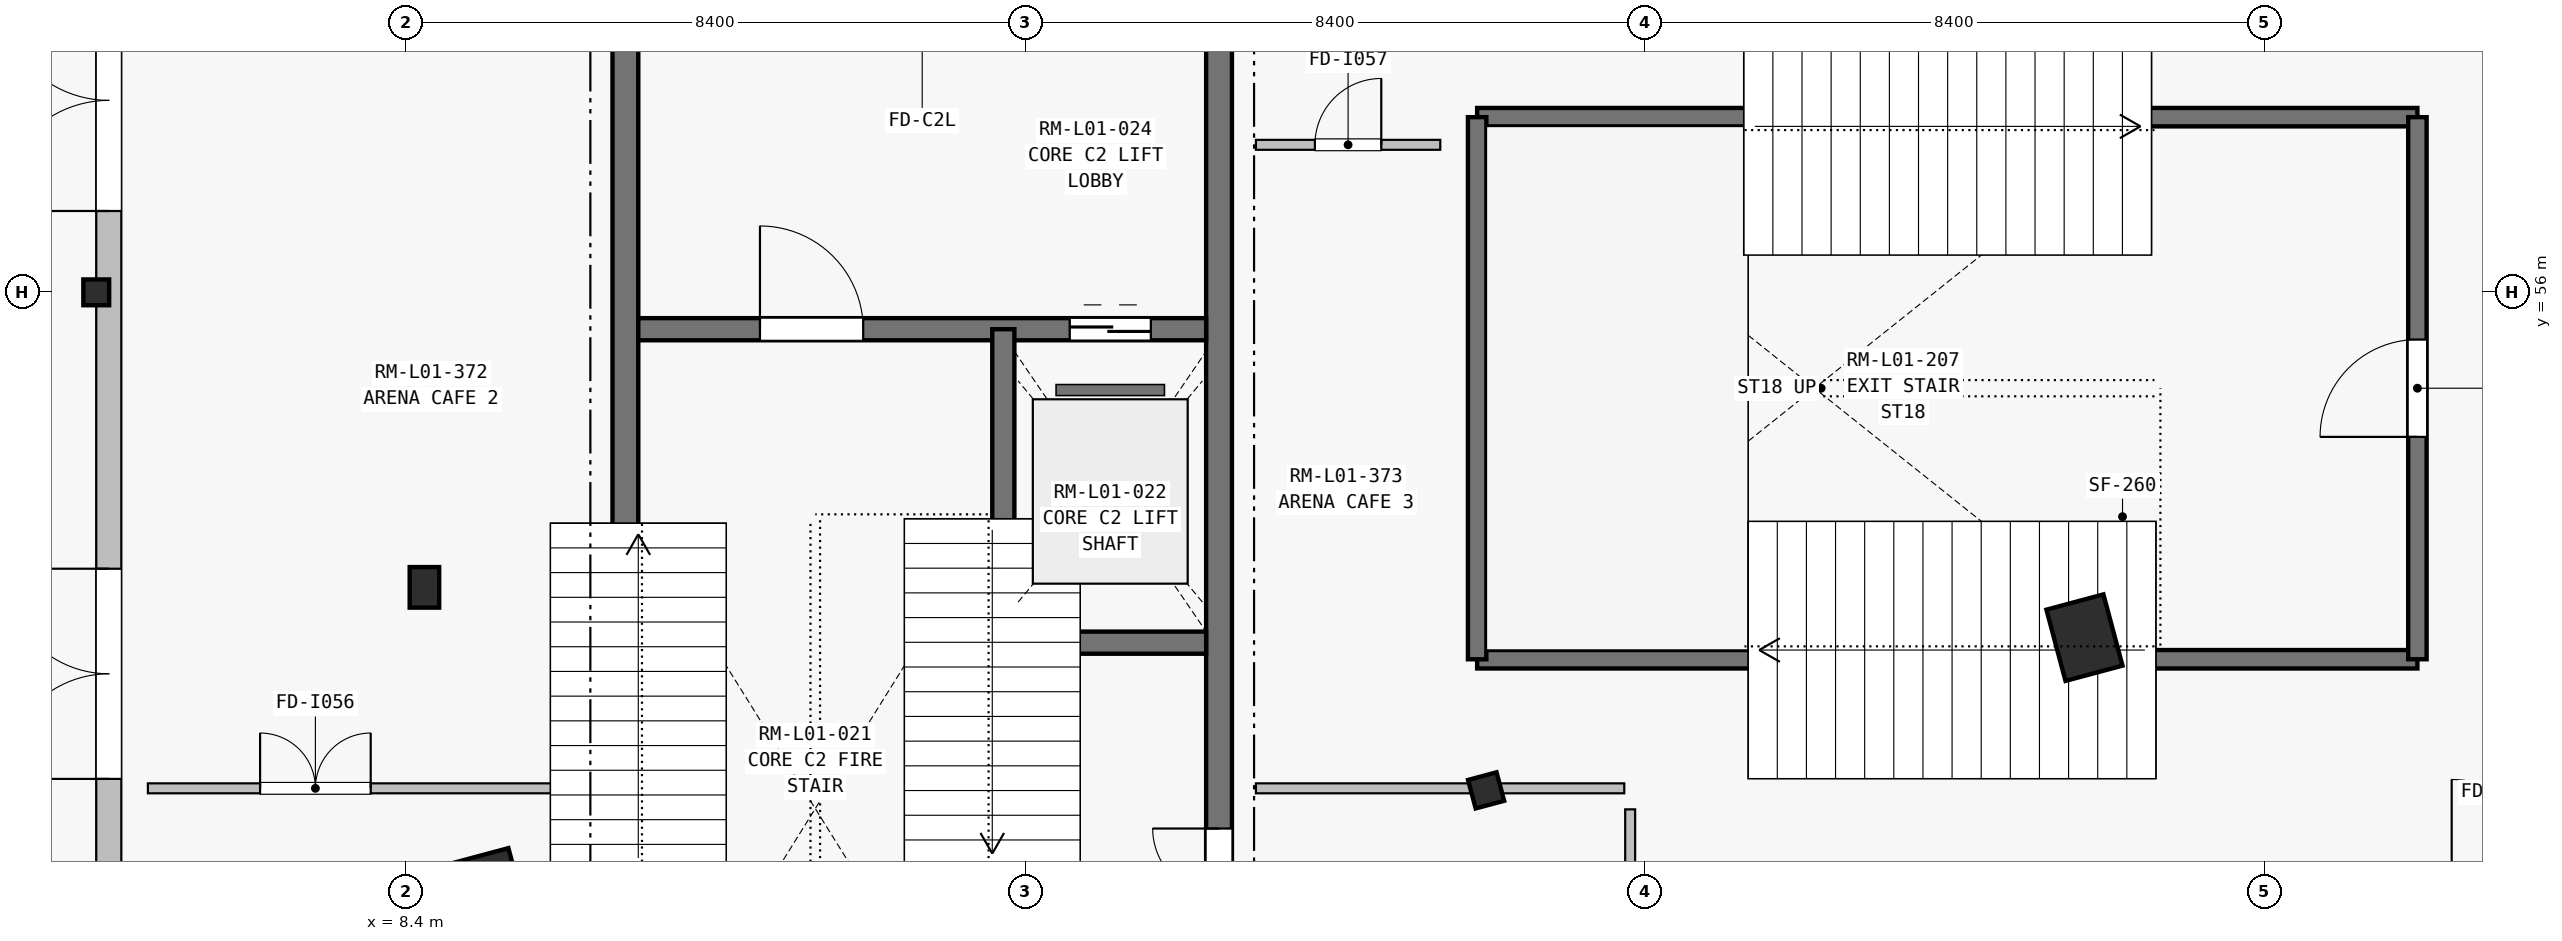
"""IFC4 building model, lengths in metres.
Left out: names, types, materials, properties, quantities, classifications, styles, units other than length and angle.
Written with IfcOpenShell. Run it as: python <this file> out.ifc"""

import sys

from ifc_helpers import new_model, si_unit, direction, frame, frame_2d, origin, origin_2d, place, context, subcontext, project, spatial, rectangle, i_section, extrude, element, fill, save


model = new_model("IFC4")
c1 = context("Model", 3, precision=1e-05, world=origin(), true_north=direction((0.0, 1.0)))
c2 = subcontext(c1, "Body", "Model", "MODEL_VIEW")
j1 = project(units=[si_unit("LENGTHUNIT", "METRE"), si_unit("PLANEANGLEUNIT", "RADIAN")], contexts=[c1])
p1 = place(None, origin())
s1 = spatial("IfcSite", under=j1, at=p1, CompositionType="ELEMENT")
p2 = place(p1, origin())
s2 = spatial("IfcBuilding", under=s1, at=p2, CompositionType="ELEMENT")
p3 = place(p2, frame((0.0, 0.0, 5.4)))
s3 = spatial("IfcBuildingStorey", under=s2, at=p3, CompositionType="ELEMENT", Elevation=5.4)
p4 = place(p3, frame((31.16, 51.318, 0.0), z_axis=(0.0, 0.0, 1.0), x_axis=(-0.965925826289, -0.258819045103, 0.0)))
e1 = element("IfcColumn", 1, at=p4, inside=s3, PredefinedType="COLUMN", context=c2, shape_type="SweptSolid", body=[
    extrude(rectangle(XDim=0.8, YDim=1.0, at=origin_2d()), origin(), (0.0, 0.0, 1.0), 4.5),
])
p5 = place(p3, frame((23.046, 49.247, 0.0), z_axis=(0.0, 0.0, 1.0), x_axis=(-0.965925826289, -0.258819045103, 0.0)))
e2 = element("IfcColumn", 2, at=p5, inside=s3, PredefinedType="COLUMN", context=c2, shape_type="SweptSolid", body=[
    extrude(i_section(OverallWidth=0.4, OverallDepth=0.4, WebThickness=0.018, FlangeThickness=0.032, at=origin_2d()), origin(), (0.0, 0.0, 1.0), 4.5),
])
p6 = place(p3, frame((9.524, 48.005, 0.0), z_axis=(0.0, 0.0, 1.0), x_axis=(-0.965925826289, -0.258819045103, 0.0)))
e3 = element("IfcColumn", 3, at=p6, inside=s3, PredefinedType="COLUMN", context=c2, shape_type="SweptSolid", body=[
    extrude(rectangle(XDim=0.75, YDim=0.75, at=origin_2d()), origin(), (0.0, 0.0, 1.0), 4.24),
])
p7 = place(p3, frame((4.2, 56.0, 0.0), z_axis=(0.0, 0.0, 1.0), x_axis=(1.0, 0.0, 0.0)))
e4 = element("IfcColumn", 4, at=p7, inside=s3, PredefinedType="COLUMN", context=c2, shape_type="SweptSolid", body=[
    extrude(i_section(OverallWidth=0.35, OverallDepth=0.35, WebThickness=0.014, FlangeThickness=0.024, at=origin_2d()), origin(), (0.0, 0.0, 1.0), 4.15),
])
p8 = place(p3, frame((8.65, 52.0, 0.0), z_axis=(0.0, 0.0, 1.0), x_axis=(1.0, 0.0, 0.0)))
e5 = element("IfcColumn", 5, at=p8, inside=s3, PredefinedType="PILASTER", context=c2, shape_type="SweptSolid", body=[
    extrude(rectangle(XDim=0.4, YDim=0.55, at=origin_2d()), origin(), (0.0, 0.0, 1.0), 4.5),
])
p9 = place(p3, frame((4.37, 35.803, 0.0), z_axis=(0.0, 0.0, 1.0), x_axis=(0.0, 1.0, 0.0)))
e6 = element("IfcWall", 6, at=p9, inside=s3, PredefinedType="SOLIDWALL", context=c2, shape_type="SweptSolid", body=[
    extrude(rectangle(XDim=56.395, YDim=0.34, at=frame_2d((28.197, 0.0))), origin(), (0.0, 0.0, 1.0), 3.673),
])
p10 = place(p9, frame((7.4, 0.0, 0.0)))
e7 = element("IfcOpeningElement", 7, at=p10, cuts=e6, PredefinedType="OPENING", context=c2, shape_type="SweptSolid", body=[
    extrude(rectangle(XDim=3.0, YDim=2.55, at=frame_2d((1.5, 1.275))), frame((0.0, 0.18, 0.0), z_axis=(0.0, -1.0, 0.0), x_axis=(1.0, 0.0, 0.0)), (0.0, 0.0, 1.0), 0.36),
])
p11 = place(p9, frame((13.6, 0.0, 0.0)))
e8 = element("IfcOpeningElement", 8, at=p11, cuts=e6, PredefinedType="OPENING", context=c2, shape_type="SweptSolid", body=[
    extrude(rectangle(XDim=2.85, YDim=2.5, at=frame_2d((1.425, 1.25))), frame((0.0, 0.18, 0.0), z_axis=(0.0, -1.0, 0.0), x_axis=(1.0, 0.0, 0.0)), (0.0, 0.0, 1.0), 0.36),
])
p12 = place(p9, frame((21.3, 0.0, 0.0)))
e9 = element("IfcOpeningElement", 9, at=p12, cuts=e6, PredefinedType="OPENING", context=c2, shape_type="SweptSolid", body=[
    extrude(rectangle(XDim=3.0, YDim=2.55, at=frame_2d((1.5, 1.275))), frame((0.0, 0.18, 0.0), z_axis=(0.0, -1.0, 0.0), x_axis=(1.0, 0.0, 0.0)), (0.0, 0.0, 1.0), 0.36),
])
p13 = place(p9, frame((32.2, 0.0, 0.0)))
e10 = element("IfcOpeningElement", 10, at=p13, cuts=e6, PredefinedType="OPENING", context=c2, shape_type="SweptSolid", body=[
    extrude(rectangle(XDim=2.85, YDim=2.5, at=frame_2d((1.425, 1.25))), frame((0.0, 0.18, 0.0), z_axis=(0.0, -1.0, 0.0), x_axis=(1.0, 0.0, 0.0)), (0.0, 0.0, 1.0), 0.36),
])
p14 = place(p9, frame((28.935, 0.0, 0.0)))
e11 = element("IfcOpeningElement", 11, at=p14, cuts=e6, PredefinedType="OPENING", context=c2, shape_type="SweptSolid", body=[
    extrude(rectangle(XDim=1.8, YDim=2.35, at=frame_2d((0.9, 1.175))), frame((0.0, 0.18, 0.0), z_axis=(0.0, -1.0, 0.0), x_axis=(1.0, 0.0, 0.0)), (0.0, 0.0, 1.0), 0.36),
])
p15 = place(p9, frame((25.825, 0.0, 0.9)))
e12 = element("IfcOpeningElement", 12, at=p15, cuts=e6, PredefinedType="OPENING", context=c2, shape_type="SweptSolid", body=[
    extrude(rectangle(XDim=0.85, YDim=2.1, at=frame_2d((0.425, 1.05))), frame((0.0, 0.18, 0.0), z_axis=(0.0, -1.0, 0.0), x_axis=(1.0, 0.0, 0.0)), (0.0, 0.0, 1.0), 0.36),
])
p16 = place(p9, frame((39.225, 0.0, 0.75)))
e13 = element("IfcOpeningElement", 13, at=p16, cuts=e6, PredefinedType="OPENING", context=c2, shape_type="SweptSolid", body=[
    extrude(rectangle(XDim=1.65, YDim=2.4, at=frame_2d((0.825, 1.2))), frame((0.0, 0.18, 0.0), z_axis=(0.0, -1.0, 0.0), x_axis=(1.0, 0.0, 0.0)), (0.0, 0.0, 1.0), 0.36),
])
p17 = place(p9, frame((48.65, 0.0, 0.75)))
e14 = element("IfcOpeningElement", 14, at=p17, cuts=e6, PredefinedType="OPENING", context=c2, shape_type="SweptSolid", body=[
    extrude(rectangle(XDim=1.2, YDim=2.2, at=frame_2d((0.6, 1.1))), frame((0.0, 0.18, 0.0), z_axis=(0.0, -1.0, 0.0), x_axis=(1.0, 0.0, 0.0)), (0.0, 0.0, 1.0), 0.36),
])
p18 = place(p3, frame((11.375, 44.975, 0.0), z_axis=(0.0, 0.0, 1.0), x_axis=(0.0, 1.0, 0.0)))
e15 = element("IfcWall", 15, at=p18, inside=s3, PredefinedType="SHEAR", context=c2, shape_type="SweptSolid", body=[
    extrude(rectangle(XDim=14.85, YDim=0.35, at=frame_2d((7.425, 0.0))), origin(), (0.0, 0.0, 1.0), 4.5),
])
p19 = place(p3, frame((19.425, 44.975, 0.0), z_axis=(0.0, 0.0, 1.0), x_axis=(0.0, 1.0, 0.0)))
e16 = element("IfcWall", 16, at=p19, inside=s3, PredefinedType="SHEAR", context=c2, shape_type="SweptSolid", body=[
    extrude(rectangle(XDim=14.85, YDim=0.35, at=frame_2d((7.425, 0.0))), origin(), (0.0, 0.0, 1.0), 4.5),
])
p20 = place(p19, frame((2.855, 0.0, 0.0)))
e17 = element("IfcOpeningElement", 17, at=p20, cuts=e16, PredefinedType="OPENING", context=c2, shape_type="SweptSolid", body=[
    extrude(rectangle(XDim=0.9, YDim=2.1, at=frame_2d((0.45, 1.05))), frame((0.0, 0.185, 0.0), z_axis=(0.0, -1.0, 0.0), x_axis=(1.0, 0.0, 0.0)), (0.0, 0.0, 1.0), 0.37),
])
p21 = place(p3, frame((11.55, 55.5, 0.0), z_axis=(0.0, 0.0, 1.0), x_axis=(1.0, 0.0, 0.0)))
e18 = element("IfcWall", 18, at=p21, inside=s3, PredefinedType="SHEAR", context=c2, shape_type="SweptSolid", body=[
    extrude(rectangle(XDim=7.7, YDim=0.3, at=frame_2d((3.85, 0.0))), origin(), (0.0, 0.0, 1.0), 4.5),
])
p22 = place(p21, frame((1.65, 0.0, 0.0)))
e19 = element("IfcOpeningElement", 19, at=p22, cuts=e18, PredefinedType="OPENING", context=c2, shape_type="SweptSolid", body=[
    extrude(rectangle(XDim=1.4, YDim=2.2, at=frame_2d((0.7, 1.1))), frame((0.0, 0.16, 0.0), z_axis=(0.0, -1.0, 0.0), x_axis=(1.0, 0.0, 0.0)), (0.0, 0.0, 1.0), 0.32),
])
p23 = place(p21, frame((5.85, 0.0, 0.0)))
e20 = element("IfcOpeningElement", 20, at=p23, cuts=e18, PredefinedType="OPENING", context=c2, shape_type="SweptSolid", body=[
    extrude(rectangle(XDim=1.1, YDim=2.2, at=frame_2d((0.55, 1.1))), frame((0.0, 0.16, 0.0), z_axis=(0.0, -1.0, 0.0), x_axis=(1.0, 0.0, 0.0)), (0.0, 0.0, 1.0), 0.32),
])
p24 = place(p3, frame((16.5, 45.15, 0.0), z_axis=(0.0, 0.0, 1.0), x_axis=(0.0, 1.0, 0.0)))
e21 = element("IfcWall", 21, at=p24, inside=s3, PredefinedType="SHEAR", context=c2, shape_type="SweptSolid", body=[
    extrude(rectangle(XDim=10.35, YDim=0.3, at=frame_2d((5.175, 0.0))), origin(), (0.0, 0.0, 1.0), 4.5),
])
p25 = place(p3, frame((16.65, 51.25, 0.0), z_axis=(0.0, 0.0, 1.0), x_axis=(1.0, 0.0, 0.0)))
e22 = element("IfcWall", 22, at=p25, inside=s3, PredefinedType="SHEAR", context=c2, shape_type="SweptSolid", body=[
    extrude(rectangle(XDim=2.6, YDim=0.3, at=frame_2d((1.3, 0.0))), origin(), (0.0, 0.0, 1.0), 4.5),
])
for number, where, z_axis, x_axis in (
    (23, (22.925, 51.025, 0.0), (0.0, 0.0, 1.0), (1.0, 0.0, 0.0)),
    (24, (22.925, 58.375, 0.0), (0.0, 0.0, 1.0), (1.0, 0.0, 0.0)),
):
    element("IfcWall", number, at=place(p3, frame(where, z_axis=z_axis, x_axis=x_axis)), inside=s3, PredefinedType="SHEAR", context=c2, shape_type="SweptSolid", body=[
        extrude(rectangle(XDim=12.75, YDim=0.25, at=frame_2d((6.375, 0.0))), origin(), (0.0, 0.0, 1.0), 4.5),
    ])
p26 = place(p3, frame((22.925, 51.025, 0.0), z_axis=(0.0, 0.0, 1.0), x_axis=(0.0, 1.0, 0.0)))
e25 = element("IfcWall", 25, at=p26, inside=s3, PredefinedType="SHEAR", context=c2, shape_type="SweptSolid", body=[
    extrude(rectangle(XDim=7.35, YDim=0.25, at=frame_2d((3.675, 0.0))), origin(), (0.0, 0.0, 1.0), 4.5),
])
p27 = place(p3, frame((35.675, 51.025, 0.0), z_axis=(0.0, 0.0, 1.0), x_axis=(0.0, 1.0, 0.0)))
e26 = element("IfcWall", 26, at=p27, inside=s3, PredefinedType="SHEAR", context=c2, shape_type="SweptSolid", body=[
    extrude(rectangle(XDim=7.35, YDim=0.25, at=frame_2d((3.675, 0.0))), origin(), (0.0, 0.0, 1.0), 4.5),
])
p28 = place(p27, frame((3.015, 0.0, 0.0)))
e27 = element("IfcOpeningElement", 27, at=p28, cuts=e26, PredefinedType="OPENING", context=c2, shape_type="SweptSolid", body=[
    extrude(rectangle(XDim=1.32, YDim=2.2, at=frame_2d((0.66, 1.1))), frame((0.0, 0.135, 0.0), z_axis=(0.0, -1.0, 0.0), x_axis=(1.0, 0.0, 0.0)), (0.0, 0.0, 1.0), 0.27),
])
p29 = place(p3, frame((4.9, 49.275, 0.0), z_axis=(0.0, 0.0, 1.0), x_axis=(1.0, 0.0, 0.0)))
e28 = element("IfcWall", 28, at=p29, inside=s3, PredefinedType="PARTITIONING", context=c2, shape_type="SweptSolid", body=[
    extrude(rectangle(XDim=5.975, YDim=0.135, at=frame_2d((2.988, 0.0))), origin(), (0.0, 0.0, 1.0), 4.25),
])
p30 = place(p29, frame((1.521, 0.0, 0.0)))
e29 = element("IfcOpeningElement", 29, at=p30, cuts=e28, PredefinedType="OPENING", context=c2, shape_type="SweptSolid", body=[
    extrude(rectangle(XDim=1.5, YDim=2.2, at=frame_2d((0.75, 1.1))), frame((0.0, 0.077, 0.0), z_axis=(0.0, -1.0, 0.0), x_axis=(1.0, 0.0, 0.0)), (0.0, 0.0, 1.0), 0.155),
])
p31 = place(p3, frame((19.925, 49.275, 0.0), z_axis=(0.0, 0.0, 1.0), x_axis=(1.0, 0.0, 0.0)))
e30 = element("IfcWall", 30, at=p31, inside=s3, PredefinedType="PARTITIONING", context=c2, shape_type="SweptSolid", body=[
    extrude(rectangle(XDim=4.995, YDim=0.135, at=frame_2d((2.498, 0.0))), origin(), (0.0, 0.0, 1.0), 3.505),
])
p32 = place(p3, frame((25.0, 48.99, 0.0), z_axis=(0.0, 0.0, 1.0), x_axis=(0.0, -1.0, 0.0)))
e31 = element("IfcWall", 31, at=p32, inside=s3, PredefinedType="PARTITIONING", context=c2, shape_type="SweptSolid", body=[
    extrude(rectangle(XDim=12.11, YDim=0.135, at=frame_2d((6.055, 0.0))), origin(), (0.0, 0.0, 1.0), 3.515),
])
p33 = place(p32, frame((5.08, 0.0, 0.0)))
e32 = element("IfcOpeningElement", 32, at=p33, cuts=e31, PredefinedType="OPENING", context=c2, shape_type="SweptSolid", body=[
    extrude(rectangle(XDim=1.95, YDim=2.4, at=frame_2d((0.975, 1.2))), frame((0.0, 0.077, 0.0), z_axis=(0.0, -1.0, 0.0), x_axis=(1.0, 0.0, 0.0)), (0.0, 0.0, 1.0), 0.155),
])
p34 = place(p3, frame((19.925, 58.0, 0.0), z_axis=(0.0, 0.0, 1.0), x_axis=(1.0, 0.0, 0.0)))
e33 = element("IfcWall", 33, at=p34, inside=s3, PredefinedType="PARTITIONING", context=c2, shape_type="SweptSolid", body=[
    extrude(rectangle(XDim=2.5, YDim=0.135, at=frame_2d((1.25, 0.0))), origin(), (0.0, 0.0, 1.0), 3.505),
])
p35 = place(p34, frame((0.8, 0.0, 0.0)))
e34 = element("IfcOpeningElement", 34, at=p35, cuts=e33, PredefinedType="OPENING", context=c2, shape_type="SweptSolid", body=[
    extrude(rectangle(XDim=0.9, YDim=2.1, at=frame_2d((0.45, 1.05))), frame((0.0, 0.077, 0.0), z_axis=(0.0, -1.0, 0.0), x_axis=(1.0, 0.0, 0.0)), (0.0, 0.0, 1.0), 0.155),
])
p36 = place(p11, origin())
e35 = element("IfcDoor", 35, at=p36, inside=s3, OperationType="DOUBLE_DOOR_SINGLE_SWING", PredefinedType="DOOR", context=c2, shape_type="SweptSolid", body=[
    extrude(rectangle(XDim=2.85, YDim=2.5, at=frame_2d((1.425, 1.25))), frame((0.0, 0.025, 0.0), z_axis=(0.0, -1.0, 0.0), x_axis=(1.0, 0.0, 0.0)), (0.0, 0.0, 1.0), 0.05),
])
fill(e8, e35)
p37 = place(p12, origin())
e36 = element("IfcDoor", 36, at=p37, inside=s3, OperationType="DOUBLE_DOOR_SINGLE_SWING", PredefinedType="DOOR", context=c2, shape_type="SweptSolid", body=[
    extrude(rectangle(XDim=3.0, YDim=2.55, at=frame_2d((1.5, 1.275))), frame((0.0, 0.025, 0.0), z_axis=(0.0, -1.0, 0.0), x_axis=(1.0, 0.0, 0.0)), (0.0, 0.0, 1.0), 0.05),
])
fill(e9, e36)
p38 = place(p22, origin())
e37 = element("IfcDoor", 37, at=p38, inside=s3, OperationType="SINGLE_SWING_LEFT", PredefinedType="DOOR", context=c2, shape_type="SweptSolid", body=[
    extrude(rectangle(XDim=1.4, YDim=2.2, at=frame_2d((0.7, 1.1))), frame((0.0, 0.025, 0.0), z_axis=(0.0, -1.0, 0.0), x_axis=(1.0, 0.0, 0.0)), (0.0, 0.0, 1.0), 0.05),
])
fill(e19, e37)
p39 = place(p20, origin())
e38 = element("IfcDoor", 38, at=p39, inside=s3, OperationType="SINGLE_SWING_RIGHT", PredefinedType="DOOR", context=c2, shape_type="SweptSolid", body=[
    extrude(rectangle(XDim=0.9, YDim=2.1, at=frame_2d((0.45, 1.05))), frame((0.0, 0.025, 0.0), z_axis=(0.0, -1.0, 0.0), x_axis=(1.0, 0.0, 0.0)), (0.0, 0.0, 1.0), 0.05),
])
fill(e17, e38)
p40 = place(p23, origin())
e39 = element("IfcDoor", 39, at=p40, inside=s3, OperationType="SLIDING_TO_LEFT", PredefinedType="DOOR", context=c2, shape_type="SweptSolid", body=[
    extrude(rectangle(XDim=1.1, YDim=2.2, at=frame_2d((0.55, 1.1))), frame((0.0, 0.025, 0.0), z_axis=(0.0, -1.0, 0.0), x_axis=(1.0, 0.0, 0.0)), (0.0, 0.0, 1.0), 0.05),
])
fill(e20, e39)
p41 = place(p28, origin())
e40 = element("IfcDoor", 40, at=p41, inside=s3, OperationType="SINGLE_SWING_LEFT", PredefinedType="DOOR", context=c2, shape_type="SweptSolid", body=[
    extrude(rectangle(XDim=1.32, YDim=2.2, at=frame_2d((0.66, 1.1))), frame((0.0, 0.025, 0.0), z_axis=(0.0, -1.0, 0.0), x_axis=(1.0, 0.0, 0.0)), (0.0, 0.0, 1.0), 0.05),
])
fill(e27, e40)
p42 = place(p30, origin())
e41 = element("IfcDoor", 41, at=p42, inside=s3, OperationType="DOUBLE_DOOR_SINGLE_SWING", PredefinedType="DOOR", context=c2, shape_type="SweptSolid", body=[
    extrude(rectangle(XDim=1.5, YDim=2.2, at=frame_2d((0.75, 1.1))), frame((0.0, 0.025, 0.0), z_axis=(0.0, -1.0, 0.0), x_axis=(1.0, 0.0, 0.0)), (0.0, 0.0, 1.0), 0.05),
])
fill(e29, e41)
p43 = place(p35, origin())
e42 = element("IfcDoor", 42, at=p43, inside=s3, OperationType="SINGLE_SWING_RIGHT", PredefinedType="DOOR", context=c2, shape_type="SweptSolid", body=[
    extrude(rectangle(XDim=0.9, YDim=2.1, at=frame_2d((0.45, 1.05))), frame((0.0, 0.025, 0.0), z_axis=(0.0, -1.0, 0.0), x_axis=(1.0, 0.0, 0.0)), (0.0, 0.0, 1.0), 0.05),
])
fill(e34, e42)
save(model, sys.argv[1])
